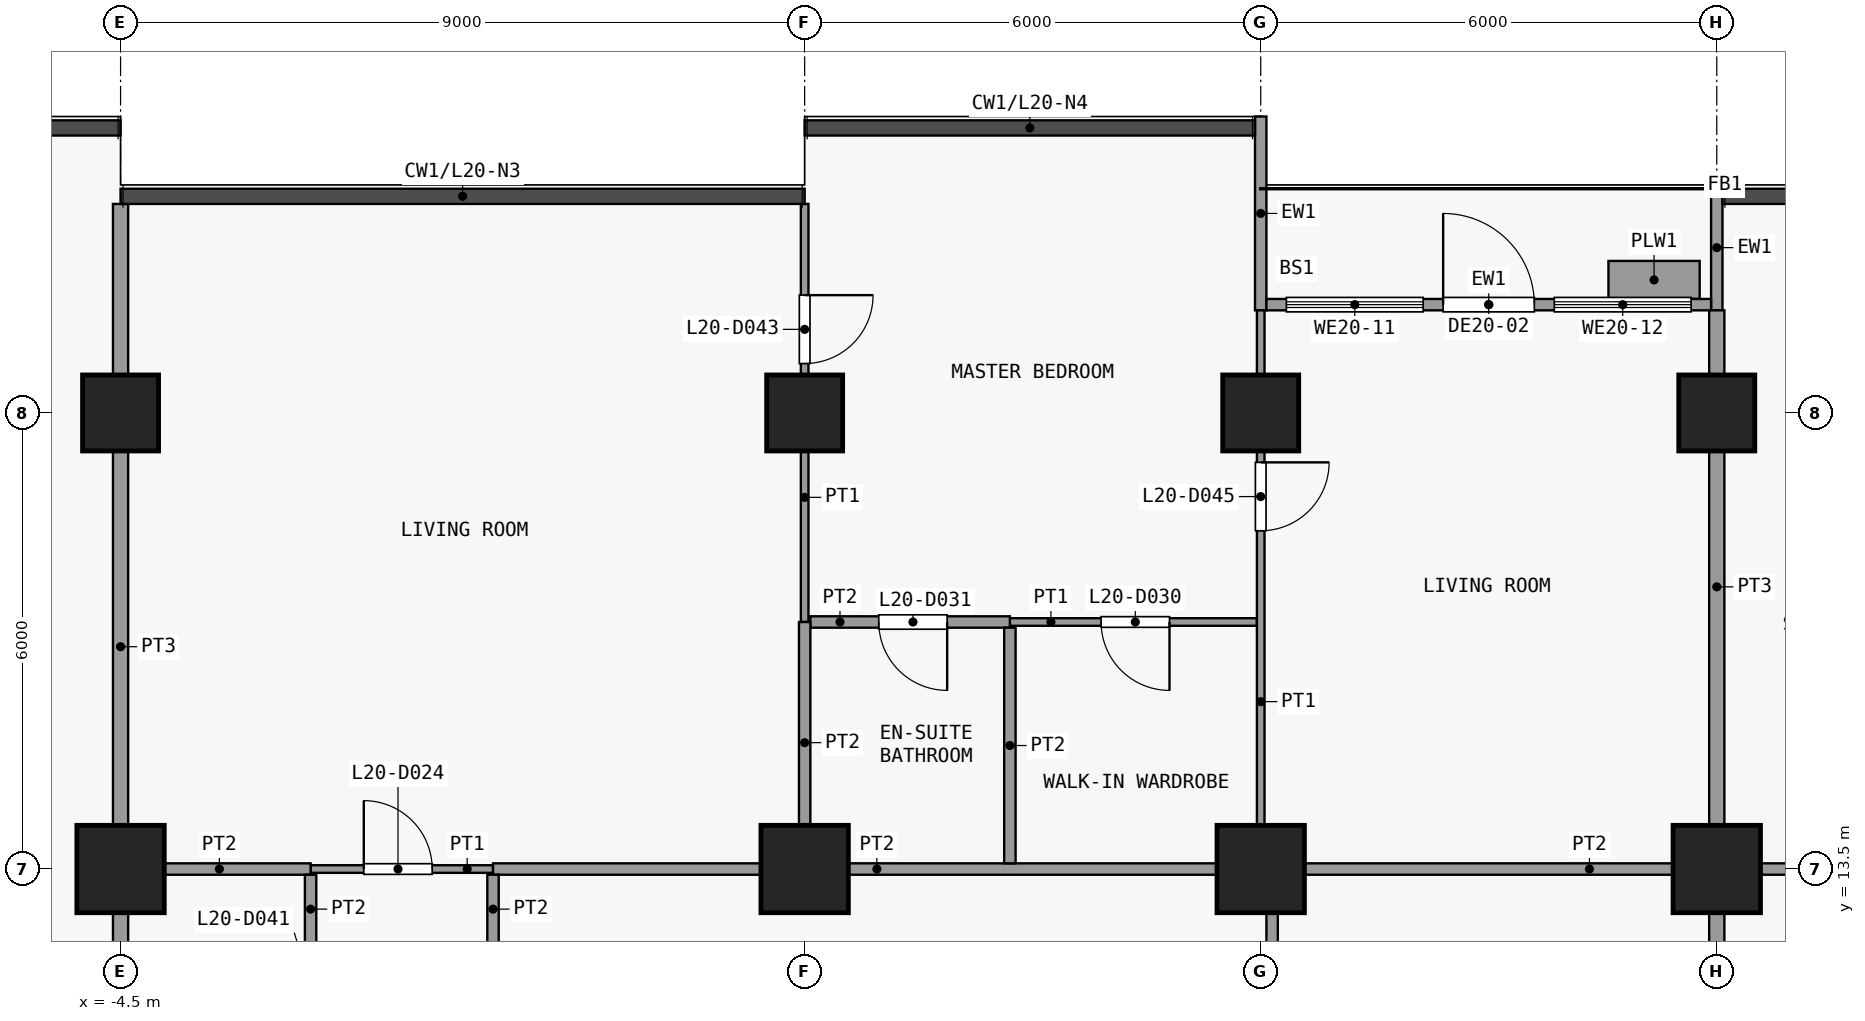
"""IFC4 building model, lengths in metres.
Left out: names, types, materials, properties, quantities, classifications, styles, units other than length and angle.
Written with IfcOpenShell. Run it as: python <this file> out.ifc"""

import sys

from ifc_helpers import new_model, si_unit, direction, frame, frame_2d, origin, origin_2d, place, context, subcontext, project, spatial, rectangle, extrude, element, fill, save


model = new_model("IFC4")
c1 = context("Model", 3, precision=1e-05, world=origin(), true_north=direction((0.0, 1.0)))
c2 = subcontext(c1, "Body", "Model", "MODEL_VIEW")
j1 = project(units=[si_unit("LENGTHUNIT", "METRE"), si_unit("PLANEANGLEUNIT", "RADIAN")], contexts=[c1])
p1 = place(None, origin())
s1 = spatial("IfcSite", under=j1, at=p1, CompositionType="ELEMENT")
p2 = place(p1, origin())
s2 = spatial("IfcBuilding", under=s1, at=p2, CompositionType="ELEMENT")
p3 = place(p2, frame((0.0, 0.0, 84.7)))
s3 = spatial("IfcBuildingStorey", under=s2, at=p3, CompositionType="ELEMENT", Elevation=84.7)
p4 = place(p3, frame((-4.5, 13.5, 0.0), z_axis=(0.0, 0.0, 1.0), x_axis=(1.0, 0.0, 0.0)))
e1 = element("IfcColumn", 1, at=p4, inside=s3, PredefinedType="COLUMN", context=c2, shape_type="SweptSolid", body=[
    extrude(rectangle(XDim=1.15, YDim=1.15, at=origin_2d()), origin(), (0.0, 0.0, 1.0), 3.6),
])
p5 = place(p3, frame((-4.5, 19.5, 0.0), z_axis=(0.0, 0.0, 1.0), x_axis=(1.0, 0.0, 0.0)))
e2 = element("IfcColumn", 2, at=p5, inside=s3, PredefinedType="COLUMN", context=c2, shape_type="SweptSolid", body=[
    extrude(rectangle(XDim=1.0, YDim=1.0, at=origin_2d()), origin(), (0.0, 0.0, 1.0), 3.6),
])
p6 = place(p3, frame((4.5, 13.5, 0.0), z_axis=(0.0, 0.0, 1.0), x_axis=(1.0, 0.0, 0.0)))
e3 = element("IfcColumn", 3, at=p6, inside=s3, PredefinedType="COLUMN", context=c2, shape_type="SweptSolid", body=[
    extrude(rectangle(XDim=1.15, YDim=1.15, at=origin_2d()), origin(), (0.0, 0.0, 1.0), 3.6),
])
p7 = place(p3, frame((4.5, 19.5, 0.0), z_axis=(0.0, 0.0, 1.0), x_axis=(1.0, 0.0, 0.0)))
e4 = element("IfcColumn", 4, at=p7, inside=s3, PredefinedType="COLUMN", context=c2, shape_type="SweptSolid", body=[
    extrude(rectangle(XDim=1.0, YDim=1.0, at=origin_2d()), origin(), (0.0, 0.0, 1.0), 3.6),
])
p8 = place(p3, frame((10.5, 13.5, 0.0), z_axis=(0.0, 0.0, 1.0), x_axis=(1.0, 0.0, 0.0)))
e5 = element("IfcColumn", 5, at=p8, inside=s3, PredefinedType="COLUMN", context=c2, shape_type="SweptSolid", body=[
    extrude(rectangle(XDim=1.15, YDim=1.15, at=origin_2d()), origin(), (0.0, 0.0, 1.0), 3.6),
])
p9 = place(p3, frame((10.5, 19.5, 0.0), z_axis=(0.0, 0.0, 1.0), x_axis=(1.0, 0.0, 0.0)))
e6 = element("IfcColumn", 6, at=p9, inside=s3, PredefinedType="COLUMN", context=c2, shape_type="SweptSolid", body=[
    extrude(rectangle(XDim=1.0, YDim=1.0, at=origin_2d()), origin(), (0.0, 0.0, 1.0), 3.6),
])
p10 = place(p3, frame((16.5, 13.5, 0.0), z_axis=(0.0, 0.0, 1.0), x_axis=(1.0, 0.0, 0.0)))
e7 = element("IfcColumn", 7, at=p10, inside=s3, PredefinedType="COLUMN", context=c2, shape_type="SweptSolid", body=[
    extrude(rectangle(XDim=1.15, YDim=1.15, at=origin_2d()), origin(), (0.0, 0.0, 1.0), 3.6),
])
p11 = place(p3, frame((16.5, 19.5, 0.0), z_axis=(0.0, 0.0, 1.0), x_axis=(1.0, 0.0, 0.0)))
e8 = element("IfcColumn", 8, at=p11, inside=s3, PredefinedType="COLUMN", context=c2, shape_type="SweptSolid", body=[
    extrude(rectangle(XDim=1.0, YDim=1.0, at=origin_2d()), origin(), (0.0, 0.0, 1.0), 3.6),
])
p12 = place(p3, frame((10.5, 20.85, 0.0), z_axis=(0.0, 0.0, 1.0), x_axis=(0.0, 1.0, 0.0)))
e9 = element("IfcWall", 9, at=p12, inside=s3, PredefinedType="SOLIDWALL", context=c2, shape_type="SweptSolid", body=[
    extrude(rectangle(XDim=2.55, YDim=0.15, at=frame_2d((1.275, 0.0))), origin(), (0.0, 0.0, 1.0), 3.3),
])
p13 = place(p3, frame((16.5, 20.85, 0.0), z_axis=(0.0, 0.0, 1.0), x_axis=(0.0, 1.0, 0.0)))
e10 = element("IfcWall", 10, at=p13, inside=s3, PredefinedType="SOLIDWALL", context=c2, shape_type="SweptSolid", body=[
    extrude(rectangle(XDim=1.65, YDim=0.15, at=frame_2d((0.825, 0.0))), origin(), (0.0, 0.0, 1.0), 3.3),
])
p14 = place(p3, frame((10.575, 20.925, 0.0), z_axis=(0.0, 0.0, 1.0), x_axis=(1.0, 0.0, 0.0)))
e11 = element("IfcWall", 11, at=p14, inside=s3, PredefinedType="SOLIDWALL", context=c2, shape_type="SweptSolid", body=[
    extrude(rectangle(XDim=5.85, YDim=0.15, at=frame_2d((2.925, 0.0))), origin(), (0.0, 0.0, 1.0), 3.3),
])
p15 = place(p14, frame((2.325, 0.0, 0.0)))
e12 = element("IfcOpeningElement", 12, at=p15, cuts=e11, PredefinedType="OPENING", context=c2, shape_type="SweptSolid", body=[
    extrude(rectangle(XDim=1.2, YDim=2.4, at=frame_2d((0.6, 1.2))), frame((0.0, 0.085, 0.0), z_axis=(0.0, -1.0, 0.0), x_axis=(1.0, 0.0, 0.0)), (0.0, 0.0, 1.0), 0.17),
])
p16 = place(p14, frame((0.262, 0.0, 0.9)))
e13 = element("IfcOpeningElement", 13, at=p16, cuts=e11, PredefinedType="OPENING", context=c2, shape_type="SweptSolid", body=[
    extrude(rectangle(XDim=1.8, YDim=2.1, at=frame_2d((0.9, 1.05))), frame((0.0, 0.085, 0.0), z_axis=(0.0, -1.0, 0.0), x_axis=(1.0, 0.0, 0.0)), (0.0, 0.0, 1.0), 0.17),
])
p17 = place(p14, frame((3.788, 0.0, 0.9)))
e14 = element("IfcOpeningElement", 14, at=p17, cuts=e11, PredefinedType="OPENING", context=c2, shape_type="SweptSolid", body=[
    extrude(rectangle(XDim=1.8, YDim=2.1, at=frame_2d((0.9, 1.05))), frame((0.0, 0.085, 0.0), z_axis=(0.0, -1.0, 0.0), x_axis=(1.0, 0.0, 0.0)), (0.0, 0.0, 1.0), 0.17),
])
p18 = place(p3, frame((15.075, 21.25, 0.0), z_axis=(0.0, 0.0, 1.0), x_axis=(1.0, 0.0, 0.0)))
e15 = element("IfcWall", 15, at=p18, inside=s3, PredefinedType="USERDEFINED", context=c2, shape_type="SweptSolid", body=[
    extrude(rectangle(XDim=1.2, YDim=0.5, at=frame_2d((0.6, 0.0))), origin(), (0.0, 0.0, 1.0), 0.9),
])
p19 = place(p3, frame((-2.0, 13.5, 0.0), z_axis=(0.0, 0.0, 1.0), x_axis=(1.0, 0.0, 0.0)))
e16 = element("IfcWall", 16, at=p19, inside=s3, PredefinedType="PARTITIONING", context=c2, shape_type="SweptSolid", body=[
    extrude(rectangle(XDim=2.4, YDim=0.1, at=frame_2d((1.2, 0.0))), origin(), (0.0, 0.0, 1.0), 3.3),
])
p20 = place(p19, frame((0.7, 0.0, 0.0)))
e17 = element("IfcOpeningElement", 17, at=p20, cuts=e16, PredefinedType="OPENING", context=c2, shape_type="SweptSolid", body=[
    extrude(rectangle(XDim=0.9, YDim=2.1, at=frame_2d((0.45, 1.05))), frame((0.0, 0.06, 0.0), z_axis=(0.0, -1.0, 0.0), x_axis=(1.0, 0.0, 0.0)), (0.0, 0.0, 1.0), 0.12),
])
p21 = place(p3, frame((-4.4, 13.5, 0.0), z_axis=(0.0, 0.0, 1.0), x_axis=(1.0, 0.0, 0.0)))
e18 = element("IfcWall", 18, at=p21, inside=s3, PredefinedType="PARTITIONING", context=c2, shape_type="SweptSolid", body=[
    extrude(rectangle(XDim=2.4, YDim=0.15, at=frame_2d((1.2, 0.0))), origin(), (0.0, 0.0, 1.0), 3.3),
])
p22 = place(p3, frame((0.4, 13.5, 0.0), z_axis=(0.0, 0.0, 1.0), x_axis=(1.0, 0.0, 0.0)))
e19 = element("IfcWall", 19, at=p22, inside=s3, PredefinedType="PARTITIONING", context=c2, shape_type="SweptSolid", body=[
    extrude(rectangle(XDim=10.1, YDim=0.15, at=frame_2d((5.05, 0.0))), origin(), (0.0, 0.0, 1.0), 3.3),
])
p23 = place(p3, frame((10.65, 13.5, 0.0), z_axis=(0.0, 0.0, 1.0), x_axis=(1.0, 0.0, 0.0)))
e20 = element("IfcWall", 20, at=p23, inside=s3, PredefinedType="PARTITIONING", context=c2, shape_type="SweptSolid", body=[
    extrude(rectangle(XDim=8.35, YDim=0.15, at=frame_2d((4.175, 0.0))), origin(), (0.0, 0.0, 1.0), 3.3),
])
p24 = place(p3, frame((7.2, 16.75, 0.0), z_axis=(0.0, 0.0, 1.0), x_axis=(1.0, 0.0, 0.0)))
e21 = element("IfcWall", 21, at=p24, inside=s3, PredefinedType="PARTITIONING", context=c2, shape_type="SweptSolid", body=[
    extrude(rectangle(XDim=3.25, YDim=0.1, at=frame_2d((1.625, 0.0))), origin(), (0.0, 0.0, 1.0), 3.3),
])
p25 = place(p24, frame((1.2, 0.0, 0.0)))
e22 = element("IfcOpeningElement", 22, at=p25, cuts=e21, PredefinedType="OPENING", context=c2, shape_type="SweptSolid", body=[
    extrude(rectangle(XDim=0.9, YDim=2.1, at=frame_2d((0.45, 1.05))), frame((0.0, 0.06, 0.0), z_axis=(0.0, -1.0, 0.0), x_axis=(1.0, 0.0, 0.0)), (0.0, 0.0, 1.0), 0.12),
])
p26 = place(p3, frame((4.575, 16.75, 0.0), z_axis=(0.0, 0.0, 1.0), x_axis=(1.0, 0.0, 0.0)))
e23 = element("IfcWall", 23, at=p26, inside=s3, PredefinedType="PARTITIONING", context=c2, shape_type="SweptSolid", body=[
    extrude(rectangle(XDim=2.625, YDim=0.15, at=frame_2d((1.312, 0.0))), origin(), (0.0, 0.0, 1.0), 3.3),
])
p27 = place(p26, frame((0.9, 0.0, 0.0)))
e24 = element("IfcOpeningElement", 24, at=p27, cuts=e23, PredefinedType="OPENING", context=c2, shape_type="SweptSolid", body=[
    extrude(rectangle(XDim=0.9, YDim=2.1, at=frame_2d((0.45, 1.05))), frame((0.0, 0.085, 0.0), z_axis=(0.0, -1.0, 0.0), x_axis=(1.0, 0.0, 0.0)), (0.0, 0.0, 1.0), 0.17),
])
p28 = place(p3, frame((-4.5, 10.6, 0.0), z_axis=(0.0, 0.0, 1.0), x_axis=(0.0, 1.0, 0.0)))
e25 = element("IfcWall", 25, at=p28, inside=s3, PredefinedType="PARTITIONING", context=c2, shape_type="SweptSolid", body=[
    extrude(rectangle(XDim=11.65, YDim=0.2, at=frame_2d((5.825, 0.0))), origin(), (0.0, 0.0, 1.0), 3.3),
])
p29 = place(p3, frame((-2.0, 10.6, 0.0), z_axis=(0.0, 0.0, 1.0), x_axis=(0.0, 1.0, 0.0)))
e26 = element("IfcWall", 26, at=p29, inside=s3, PredefinedType="PARTITIONING", context=c2, shape_type="SweptSolid", body=[
    extrude(rectangle(XDim=2.825, YDim=0.15, at=frame_2d((1.413, 0.0))), origin(), (0.0, 0.0, 1.0), 3.3),
])
p30 = place(p29, frame((0.9, 0.0, 0.0)))
e27 = element("IfcOpeningElement", 27, at=p30, cuts=e26, PredefinedType="OPENING", context=c2, shape_type="SweptSolid", body=[
    extrude(rectangle(XDim=0.9, YDim=2.1, at=frame_2d((0.45, 1.05))), frame((0.0, 0.085, 0.0), z_axis=(0.0, -1.0, 0.0), x_axis=(1.0, 0.0, 0.0)), (0.0, 0.0, 1.0), 0.17),
])
p31 = place(p3, frame((0.4, 10.6, 0.0), z_axis=(0.0, 0.0, 1.0), x_axis=(0.0, 1.0, 0.0)))
e28 = element("IfcWall", 28, at=p31, inside=s3, PredefinedType="PARTITIONING", context=c2, shape_type="SweptSolid", body=[
    extrude(rectangle(XDim=2.825, YDim=0.15, at=frame_2d((1.413, 0.0))), origin(), (0.0, 0.0, 1.0), 3.3),
])
p32 = place(p31, frame((0.9, 0.0, 0.0)))
e29 = element("IfcOpeningElement", 29, at=p32, cuts=e28, PredefinedType="OPENING", context=c2, shape_type="SweptSolid", body=[
    extrude(rectangle(XDim=0.9, YDim=2.1, at=frame_2d((0.45, 1.05))), frame((0.0, 0.085, 0.0), z_axis=(0.0, -1.0, 0.0), x_axis=(1.0, 0.0, 0.0)), (0.0, 0.0, 1.0), 0.17),
])
p33 = place(p3, frame((4.5, 16.75, 0.0), z_axis=(0.0, 0.0, 1.0), x_axis=(0.0, 1.0, 0.0)))
e30 = element("IfcWall", 30, at=p33, inside=s3, PredefinedType="PARTITIONING", context=c2, shape_type="SweptSolid", body=[
    extrude(rectangle(XDim=5.5, YDim=0.1, at=frame_2d((2.75, 0.0))), origin(), (0.0, 0.0, 1.0), 3.3),
])
p34 = place(p33, frame((3.4, 0.0, 0.0)))
e31 = element("IfcOpeningElement", 31, at=p34, cuts=e30, PredefinedType="OPENING", context=c2, shape_type="SweptSolid", body=[
    extrude(rectangle(XDim=0.9, YDim=2.1, at=frame_2d((0.45, 1.05))), frame((0.0, 0.06, 0.0), z_axis=(0.0, -1.0, 0.0), x_axis=(1.0, 0.0, 0.0)), (0.0, 0.0, 1.0), 0.12),
])
p35 = place(p3, frame((4.5, 13.575, 0.0), z_axis=(0.0, 0.0, 1.0), x_axis=(0.0, 1.0, 0.0)))
e32 = element("IfcWall", 32, at=p35, inside=s3, PredefinedType="PARTITIONING", context=c2, shape_type="SweptSolid", body=[
    extrude(rectangle(XDim=3.175, YDim=0.15, at=frame_2d((1.587, 0.0))), origin(), (0.0, 0.0, 1.0), 3.3),
])
p36 = place(p3, frame((7.2, 13.575, 0.0), z_axis=(0.0, 0.0, 1.0), x_axis=(0.0, 1.0, 0.0)))
e33 = element("IfcWall", 33, at=p36, inside=s3, PredefinedType="PARTITIONING", context=c2, shape_type="SweptSolid", body=[
    extrude(rectangle(XDim=3.1, YDim=0.15, at=frame_2d((1.55, 0.0))), origin(), (0.0, 0.0, 1.0), 3.3),
])
p37 = place(p3, frame((10.5, 13.575, 0.0), z_axis=(0.0, 0.0, 1.0), x_axis=(0.0, 1.0, 0.0)))
e34 = element("IfcWall", 34, at=p37, inside=s3, PredefinedType="PARTITIONING", context=c2, shape_type="SweptSolid", body=[
    extrude(rectangle(XDim=7.275, YDim=0.1, at=frame_2d((3.638, 0.0))), origin(), (0.0, 0.0, 1.0), 3.3),
])
p38 = place(p37, frame((4.375, 0.0, 0.0)))
e35 = element("IfcOpeningElement", 35, at=p38, cuts=e34, PredefinedType="OPENING", context=c2, shape_type="SweptSolid", body=[
    extrude(rectangle(XDim=0.9, YDim=2.1, at=frame_2d((0.45, 1.05))), frame((0.0, 0.06, 0.0), z_axis=(0.0, -1.0, 0.0), x_axis=(1.0, 0.0, 0.0)), (0.0, 0.0, 1.0), 0.12),
])
p39 = place(p3, frame((10.65, 10.6, 0.0), z_axis=(0.0, 0.0, 1.0), x_axis=(0.0, 1.0, 0.0)))
e36 = element("IfcWall", 36, at=p39, inside=s3, PredefinedType="PARTITIONING", context=c2, shape_type="SweptSolid", body=[
    extrude(rectangle(XDim=2.825, YDim=0.15, at=frame_2d((1.413, 0.0))), origin(), (0.0, 0.0, 1.0), 3.3),
])
p40 = place(p39, frame((1.0, 0.0, 0.0)))
e37 = element("IfcOpeningElement", 37, at=p40, cuts=e36, PredefinedType="OPENING", context=c2, shape_type="SweptSolid", body=[
    extrude(rectangle(XDim=0.9, YDim=2.1, at=frame_2d((0.45, 1.05))), frame((0.0, 0.085, 0.0), z_axis=(0.0, -1.0, 0.0), x_axis=(1.0, 0.0, 0.0)), (0.0, 0.0, 1.0), 0.17),
])
p41 = place(p3, frame((16.5, 10.6, 0.0), z_axis=(0.0, 0.0, 1.0), x_axis=(0.0, 1.0, 0.0)))
e38 = element("IfcWall", 38, at=p41, inside=s3, PredefinedType="PARTITIONING", context=c2, shape_type="SweptSolid", body=[
    extrude(rectangle(XDim=2.825, YDim=0.2, at=frame_2d((1.413, 0.0))), origin(), (0.0, 0.0, 1.0), 3.3),
])
p42 = place(p3, frame((16.5, 13.575, 0.0), z_axis=(0.0, 0.0, 1.0), x_axis=(0.0, 1.0, 0.0)))
e39 = element("IfcWall", 39, at=p42, inside=s3, PredefinedType="PARTITIONING", context=c2, shape_type="SweptSolid", body=[
    extrude(rectangle(XDim=7.275, YDim=0.2, at=frame_2d((3.638, 0.0))), origin(), (0.0, 0.0, 1.0), 3.3),
])
p43 = place(p15, origin())
e40 = element("IfcDoor", 40, at=p43, inside=s3, OperationType="SINGLE_SWING_LEFT", PredefinedType="DOOR", context=c2, shape_type="SweptSolid", body=[
    extrude(rectangle(XDim=1.2, YDim=2.4, at=frame_2d((0.6, 1.2))), frame((0.0, 0.025, 0.0), z_axis=(0.0, -1.0, 0.0), x_axis=(1.0, 0.0, 0.0)), (0.0, 0.0, 1.0), 0.05),
])
fill(e12, e40)
p44 = place(p16, origin())
e41 = element("IfcWindow", 41, at=p44, inside=s3, PartitioningType="SINGLE_PANEL", PredefinedType="WINDOW", context=c2, shape_type="SweptSolid", body=[
    extrude(rectangle(XDim=1.8, YDim=2.1, at=frame_2d((0.9, 1.05))), frame((0.0, 0.03, 0.0), z_axis=(0.0, -1.0, 0.0), x_axis=(1.0, 0.0, 0.0)), (0.0, 0.0, 1.0), 0.06),
])
fill(e13, e41)
p45 = place(p17, origin())
e42 = element("IfcWindow", 42, at=p45, inside=s3, PartitioningType="SINGLE_PANEL", PredefinedType="WINDOW", context=c2, shape_type="SweptSolid", body=[
    extrude(rectangle(XDim=1.8, YDim=2.1, at=frame_2d((0.9, 1.05))), frame((0.0, 0.03, 0.0), z_axis=(0.0, -1.0, 0.0), x_axis=(1.0, 0.0, 0.0)), (0.0, 0.0, 1.0), 0.06),
])
fill(e14, e42)
p46 = place(p20, origin())
e43 = element("IfcDoor", 43, at=p46, inside=s3, OperationType="SINGLE_SWING_RIGHT", PredefinedType="DOOR", context=c2, shape_type="SweptSolid", body=[
    extrude(rectangle(XDim=0.9, YDim=2.1, at=frame_2d((0.45, 1.05))), frame((0.0, 0.025, 0.0), z_axis=(0.0, -1.0, 0.0), x_axis=(1.0, 0.0, 0.0)), (0.0, 0.0, 1.0), 0.05),
])
fill(e17, e43)
p47 = place(p25, origin())
e44 = element("IfcDoor", 44, at=p47, inside=s3, OperationType="SINGLE_SWING_RIGHT", PredefinedType="DOOR", context=c2, shape_type="SweptSolid", body=[
    extrude(rectangle(XDim=0.9, YDim=2.1, at=frame_2d((0.45, 1.05))), frame((0.0, 0.025, 0.0), z_axis=(0.0, -1.0, 0.0), x_axis=(1.0, 0.0, 0.0)), (0.0, 0.0, 1.0), 0.05),
])
fill(e22, e44)
p48 = place(p27, origin())
e45 = element("IfcDoor", 45, at=p48, inside=s3, OperationType="SINGLE_SWING_RIGHT", PredefinedType="DOOR", context=c2, shape_type="SweptSolid", body=[
    extrude(rectangle(XDim=0.9, YDim=2.1, at=frame_2d((0.45, 1.05))), frame((0.0, 0.025, 0.0), z_axis=(0.0, -1.0, 0.0), x_axis=(1.0, 0.0, 0.0)), (0.0, 0.0, 1.0), 0.05),
])
fill(e24, e45)
p49 = place(p34, origin())
e46 = element("IfcDoor", 46, at=p49, inside=s3, OperationType="SINGLE_SWING_RIGHT", PredefinedType="DOOR", context=c2, shape_type="SweptSolid", body=[
    extrude(rectangle(XDim=0.9, YDim=2.1, at=frame_2d((0.45, 1.05))), frame((0.0, 0.025, 0.0), z_axis=(0.0, -1.0, 0.0), x_axis=(1.0, 0.0, 0.0)), (0.0, 0.0, 1.0), 0.05),
])
fill(e31, e46)
p50 = place(p38, origin())
e47 = element("IfcDoor", 47, at=p50, inside=s3, OperationType="SINGLE_SWING_RIGHT", PredefinedType="DOOR", context=c2, shape_type="SweptSolid", body=[
    extrude(rectangle(XDim=0.9, YDim=2.1, at=frame_2d((0.45, 1.05))), frame((0.0, 0.025, 0.0), z_axis=(0.0, -1.0, 0.0), x_axis=(1.0, 0.0, 0.0)), (0.0, 0.0, 1.0), 0.05),
])
fill(e35, e47)
save(model, sys.argv[1])
